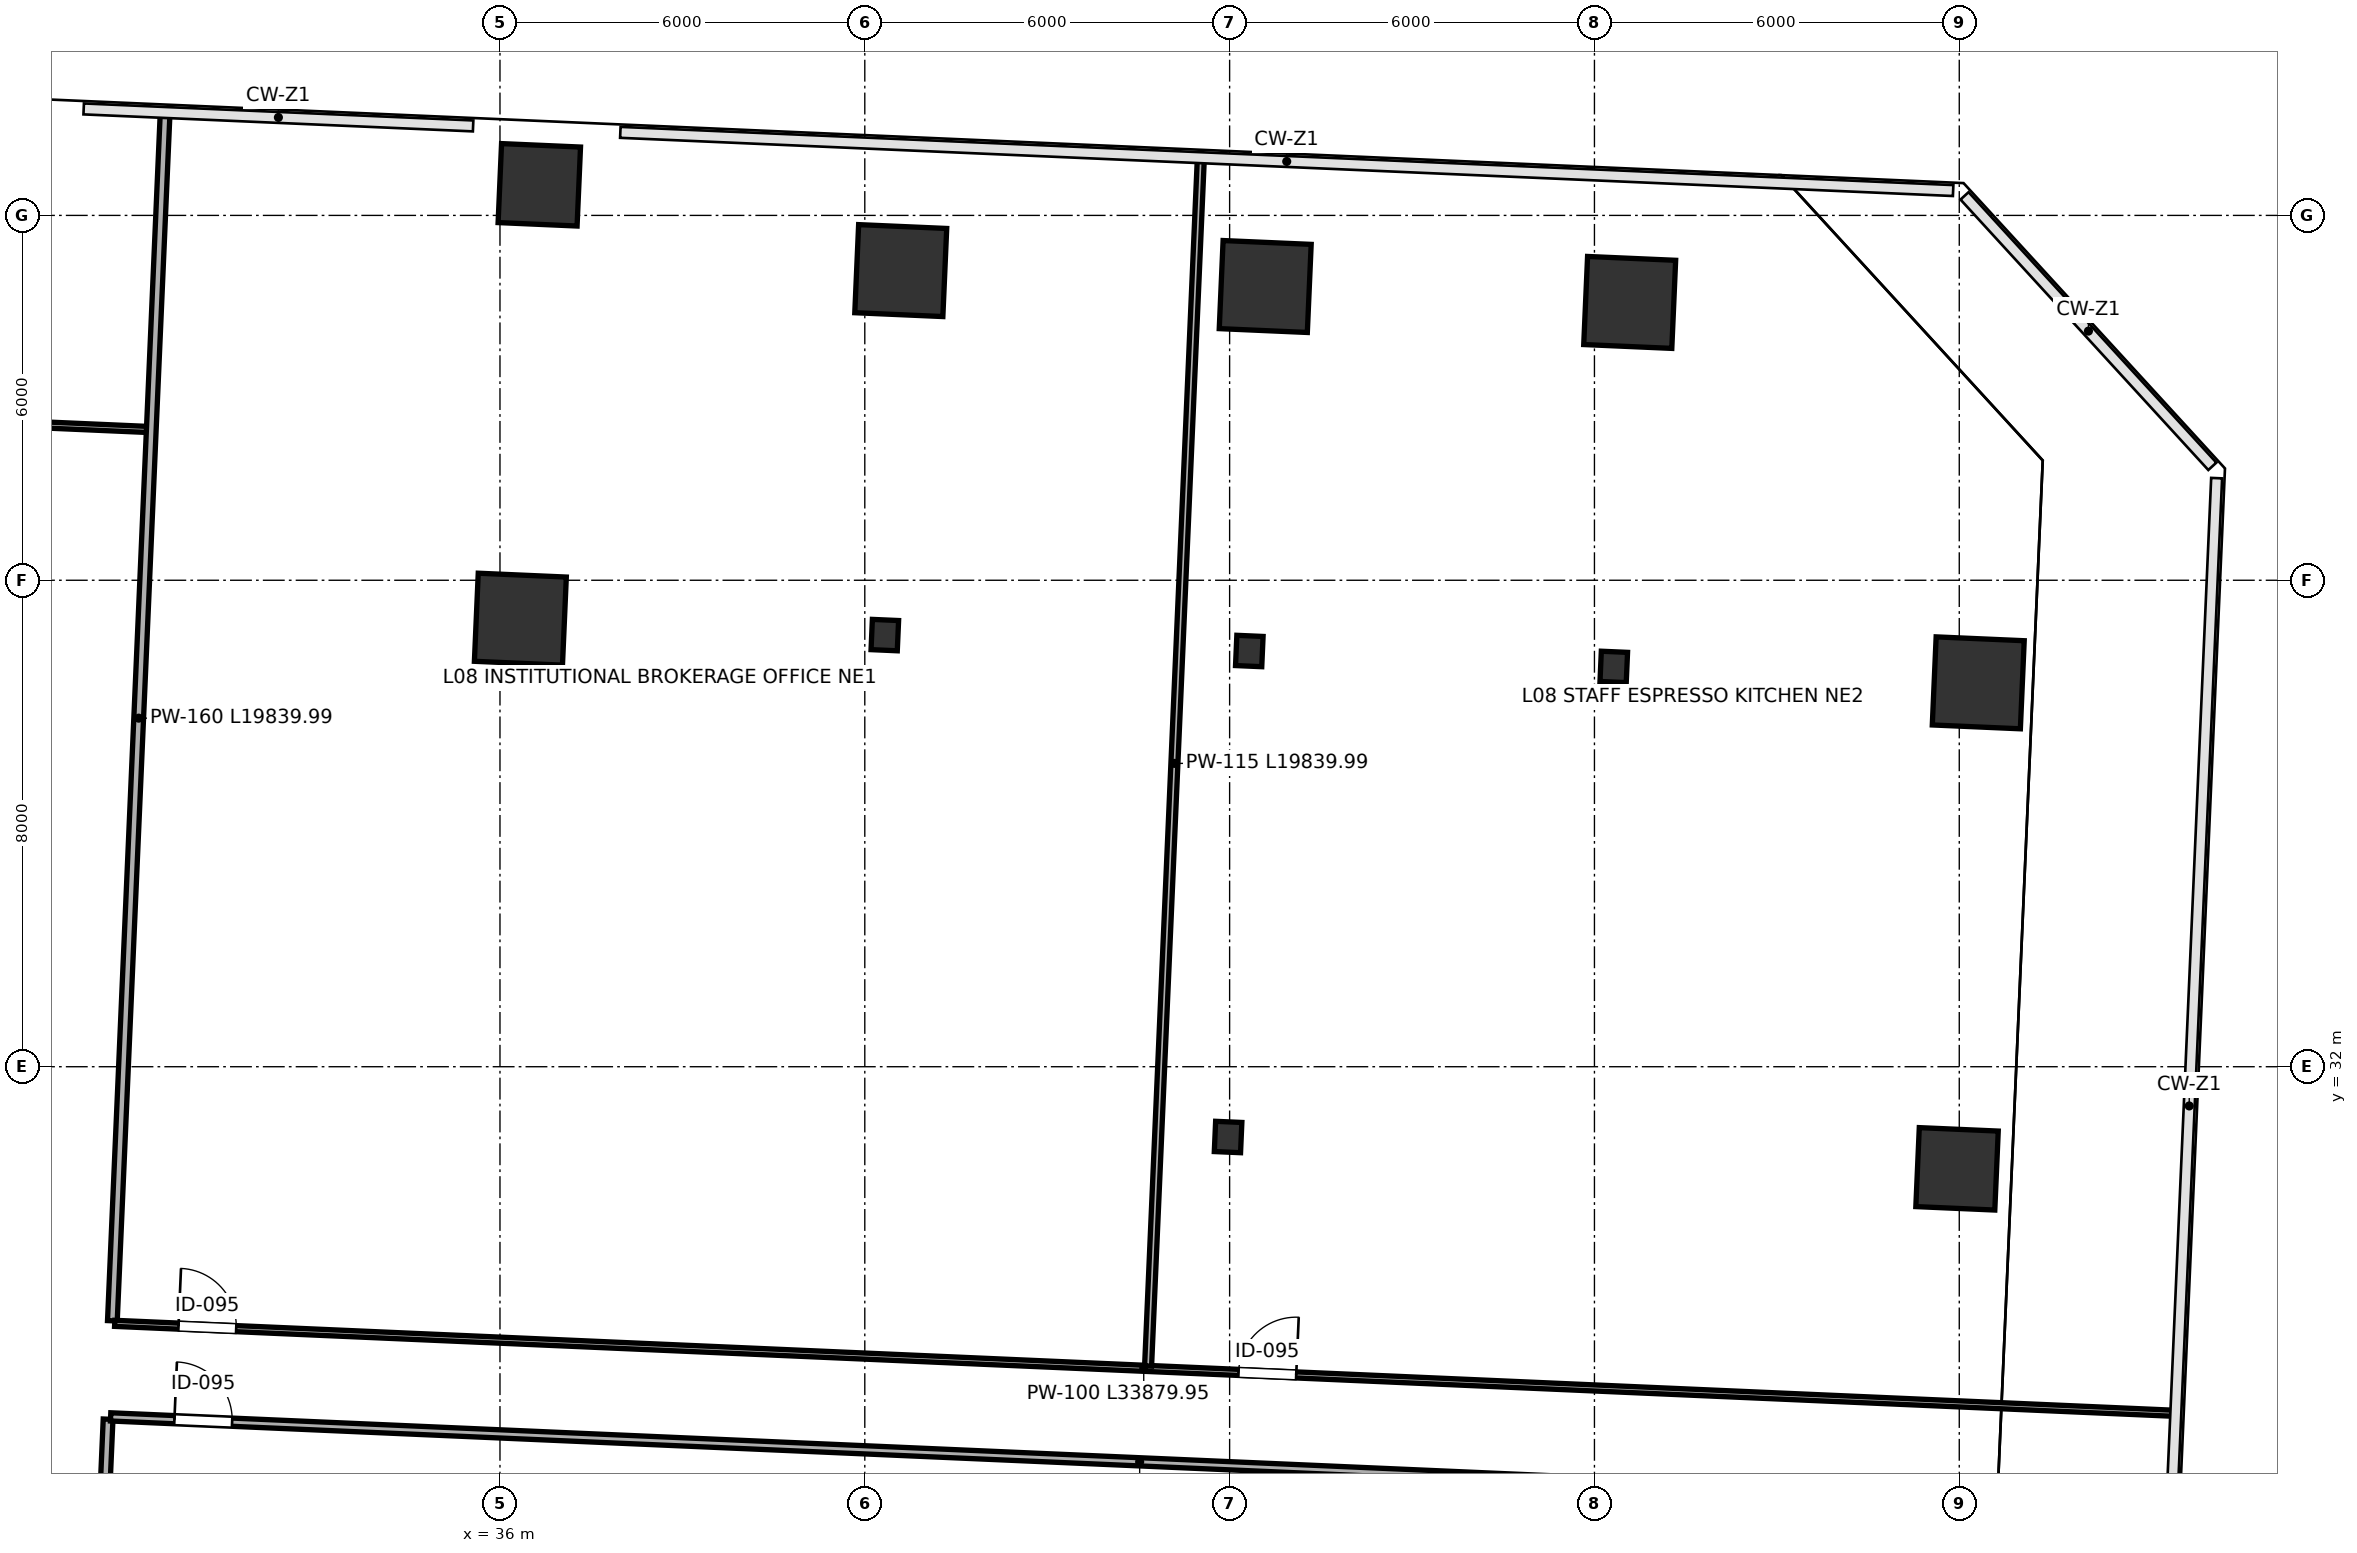
"""IFC4 building model, lengths in metres.
Left out: names, types, materials, properties, quantities, classifications, styles, units other than length and angle.
Written with IfcOpenShell. Run it as: python <this file> out.ifc"""

import sys

from ifc_helpers import new_model, si_unit, direction, frame, frame_2d, origin, origin_2d, place, context, subcontext, project, spatial, rectangle, i_section, extrude, clip, halfspace, source, transform, mapped, element, fill, save


model = new_model("IFC4")
c1 = context("Model", 3, precision=1e-05, world=origin(), true_north=direction((0.0, 1.0)))
c2 = subcontext(c1, "Body", "Model", "MODEL_VIEW")
j1 = project(units=[si_unit("LENGTHUNIT", "METRE"), si_unit("PLANEANGLEUNIT", "RADIAN")], contexts=[c1])
p1 = place(None, origin())
s1 = spatial("IfcSite", under=j1, at=p1, CompositionType="ELEMENT")
p2 = place(p1, origin())
s2 = spatial("IfcBuilding", under=s1, at=p2, CompositionType="ELEMENT")
p3 = place(p2, frame((0.0, 0.0, 37.6)))
s3 = spatial("IfcBuildingStorey", under=s2, at=p3, CompositionType="ELEMENT", Elevation=37.6)
p4 = place(p3, frame((27.656, 46.896, 0.0), z_axis=(0.067215559291, -0.028661729056, 0.997326713709), x_axis=(-0.431886115765, -0.901922515489, 0.003187328695)))
e1 = element("IfcColumn", 1, at=p4, inside=s3, PredefinedType="COLUMN", context=c2, shape_type="Clipping", body=[
    clip(clip(extrude(rectangle(XDim=1.3, YDim=1.3, at=origin_2d()), origin(), (0.0, 0.0, 1.0), 4.813), halfspace(frame((0.0, 0.0, 0.05), z_axis=(0.0, 0.0, -1.0), x_axis=(1.0, 0.0, 0.0)), False)), halfspace(frame((0.0, 0.0, 4.762), z_axis=(0.0, 0.0, 1.0), x_axis=(1.0, 0.0, 0.0)), False)),
])
p5 = place(p3, frame((36.335, 39.36, 0.0), z_axis=(0.032613723534, -0.067611342878, 0.997178545373), x_axis=(-0.918728821038, -0.39487546398, 0.003274345801)))
e2 = element("IfcColumn", 2, at=p5, inside=s3, PredefinedType="COLUMN", context=c2, shape_type="Clipping", body=[
    clip(clip(extrude(rectangle(XDim=1.45, YDim=1.45, at=origin_2d()), origin(), (0.0, 0.0, 1.0), 4.813), halfspace(frame((0.0, 0.0, 0.058), z_axis=(0.0, 0.0, -1.0), x_axis=(1.0, 0.0, 0.0)), False)), halfspace(frame((0.0, 0.0, 4.756), z_axis=(0.0, 0.0, 1.0), x_axis=(1.0, 0.0, 0.0)), False)),
])
p6 = place(p3, frame((36.647, 46.503, 0.0), z_axis=(0.064863629313, -0.06926888751, 0.995487082194), x_axis=(-0.758921651217, -0.651168789985, 0.00413935557)))
e3 = element("IfcColumn", 3, at=p6, inside=s3, PredefinedType="COLUMN", context=c2, shape_type="Clipping", body=[
    clip(clip(extrude(rectangle(XDim=1.3, YDim=1.3, at=origin_2d()), origin(), (0.0, 0.0, 1.0), 4.822), halfspace(frame((0.0, 0.0, 0.065), z_axis=(0.0, 0.0, -1.0), x_axis=(1.0, 0.0, 0.0)), False)), halfspace(frame((0.0, 0.0, 4.756), z_axis=(0.0, 0.0, 1.0), x_axis=(1.0, 0.0, 0.0)), False)),
])
p7 = place(p3, frame((42.329, 39.098, 0.0), z_axis=(0.031075882284, -0.094543563691, 0.995035579316), x_axis=(-0.962645977382, -0.270728421119, 0.004340993869)))
e4 = element("IfcColumn", 4, at=p7, inside=s3, PredefinedType="COLUMN", context=c2, shape_type="Clipping", body=[
    clip(clip(extrude(i_section(OverallWidth=0.432, OverallDepth=0.498, WebThickness=0.056, FlangeThickness=0.089, FilletRadius=0.015, at=origin_2d()), origin(), (0.0, 0.0, 1.0), 4.824), halfspace(frame((0.0, 0.0, 0.027), z_axis=(0.0, 0.0, -1.0), x_axis=(1.0, 0.0, 0.0)), False)), halfspace(frame((0.0, 0.0, 4.797), z_axis=(0.0, 0.0, 1.0), x_axis=(1.0, 0.0, 0.0)), False)),
])
p8 = place(p3, frame((42.591, 45.093, 0.0), z_axis=(0.058075175158, -0.095882164729, 0.993697078851), x_axis=(-0.876978547466, -0.480504649668, 0.004889676023)))
e5 = element("IfcColumn", 5, at=p8, inside=s3, PredefinedType="COLUMN", context=c2, shape_type="Clipping", body=[
    clip(clip(extrude(rectangle(XDim=1.45, YDim=1.45, at=origin_2d()), origin(), (0.0, 0.0, 1.0), 4.83), halfspace(frame((0.0, 0.0, 0.086), z_axis=(0.0, 0.0, -1.0), x_axis=(1.0, 0.0, 0.0)), False)), halfspace(frame((0.0, 0.0, 4.744), z_axis=(0.0, 0.0, 1.0), x_axis=(1.0, 0.0, 0.0)), False)),
])
p9 = place(p3, frame((47.975, 30.844, 0.0), z_axis=(-0.006514480751, -0.119381647256, 0.992827066432), x_axis=(-0.995204428395, 0.097677778525, 0.005215101586)))
e6 = element("IfcColumn", 6, at=p9, inside=s3, PredefinedType="COLUMN", context=c2, shape_type="Clipping", body=[
    clip(clip(extrude(i_section(OverallWidth=0.432, OverallDepth=0.498, WebThickness=0.056, FlangeThickness=0.089, FilletRadius=0.015, at=origin_2d()), origin(), (0.0, 0.0, 1.0), 4.834), halfspace(frame((0.0, 0.0, 0.032), z_axis=(0.0, 0.0, -1.0), x_axis=(1.0, 0.0, 0.0)), False)), halfspace(frame((0.0, 0.0, 4.803), z_axis=(0.0, 0.0, 1.0), x_axis=(1.0, 0.0, 0.0)), False)),
])
p10 = place(p3, frame((48.324, 38.836, 0.0), z_axis=(0.029523163424, -0.121272071294, 0.992180158815), x_axis=(-0.980934571584, -0.194262002877, 0.00544430984)))
e7 = element("IfcColumn", 7, at=p10, inside=s3, PredefinedType="COLUMN", context=c2, shape_type="Clipping", body=[
    clip(clip(extrude(i_section(OverallWidth=0.432, OverallDepth=0.498, WebThickness=0.056, FlangeThickness=0.089, FilletRadius=0.015, at=origin_2d()), origin(), (0.0, 0.0, 1.0), 4.838), halfspace(frame((0.0, 0.0, 0.033), z_axis=(0.0, 0.0, -1.0), x_axis=(1.0, 0.0, 0.0)), False)), halfspace(frame((0.0, 0.0, 4.804), z_axis=(0.0, 0.0, 1.0), x_axis=(1.0, 0.0, 0.0)), False)),
])
p11 = place(p3, frame((48.585, 44.831, 0.0), z_axis=(0.056447032157, -0.122621097533, 0.990847010895), x_axis=(-0.925582471134, -0.378500222776, 0.005888165089)))
e8 = element("IfcColumn", 8, at=p11, inside=s3, PredefinedType="COLUMN", context=c2, shape_type="Clipping", body=[
    clip(clip(extrude(rectangle(XDim=1.45, YDim=1.45, at=origin_2d()), origin(), (0.0, 0.0, 1.0), 4.844), halfspace(frame((0.0, 0.0, 0.104), z_axis=(0.0, 0.0, -1.0), x_axis=(1.0, 0.0, 0.0)), False)), halfspace(frame((0.0, 0.0, 4.74), z_axis=(0.0, 0.0, 1.0), x_axis=(1.0, 0.0, 0.0)), False)),
])
p12 = place(p3, frame((54.318, 38.575, 0.0), z_axis=(0.027908994501, -0.147741668185, 0.988632129514), x_axis=(-0.989690790543, -0.143070356158, 0.006558376519)))
e9 = element("IfcColumn", 9, at=p12, inside=s3, PredefinedType="COLUMN", context=c2, shape_type="Clipping", body=[
    clip(clip(extrude(i_section(OverallWidth=0.432, OverallDepth=0.498, WebThickness=0.056, FlangeThickness=0.089, FilletRadius=0.015, at=origin_2d()), origin(), (0.0, 0.0, 1.0), 4.855), halfspace(frame((0.0, 0.0, 0.04), z_axis=(0.0, 0.0, -1.0), x_axis=(1.0, 0.0, 0.0)), False)), halfspace(frame((0.0, 0.0, 4.815), z_axis=(0.0, 0.0, 1.0), x_axis=(1.0, 0.0, 0.0)), False)),
])
p13 = place(p3, frame((54.58, 44.569, 0.0), z_axis=(0.054839272442, -0.149050330227, 0.98730778041), x_axis=(-0.95247134279, -0.304549421177, 0.006927569902)))
e10 = element("IfcColumn", 10, at=p13, inside=s3, PredefinedType="COLUMN", context=c2, shape_type="Clipping", body=[
    clip(clip(extrude(rectangle(XDim=1.45, YDim=1.45, at=origin_2d()), origin(), (0.0, 0.0, 1.0), 4.862), halfspace(frame((0.0, 0.0, 0.122), z_axis=(0.0, 0.0, -1.0), x_axis=(1.0, 0.0, 0.0)), False)), halfspace(frame((0.0, 0.0, 4.739), z_axis=(0.0, 0.0, 1.0), x_axis=(1.0, 0.0, 0.0)), False)),
])
p14 = place(p3, frame((59.963, 30.321, 0.0), z_axis=(-0.009419364454, -0.172153916291, 0.985025027438), x_axis=(-0.995208767045, 0.097483087631, 0.007520480208)))
e11 = element("IfcColumn", 11, at=p14, inside=s3, PredefinedType="COLUMN", context=c2, shape_type="Clipping", body=[
    clip(clip(extrude(rectangle(XDim=1.3, YDim=1.3, at=origin_2d()), origin(), (0.0, 0.0, 1.0), 4.873), halfspace(frame((0.0, 0.0, 0.119), z_axis=(0.0, 0.0, -1.0), x_axis=(1.0, 0.0, 0.0)), False)), halfspace(frame((0.0, 0.0, 4.753), z_axis=(0.0, 0.0, 1.0), x_axis=(1.0, 0.0, 0.0)), False)),
])
p15 = place(p3, frame((60.312, 38.313, 0.0), z_axis=(0.026387562879, -0.173947615637, 0.984401302081), x_axis=(-0.994187743579, -0.107386385141, 0.007674294959)))
e12 = element("IfcColumn", 12, at=p15, inside=s3, PredefinedType="COLUMN", context=c2, shape_type="Clipping", body=[
    clip(clip(extrude(rectangle(XDim=1.45, YDim=1.45, at=origin_2d()), origin(), (0.0, 0.0, 1.0), 4.876), halfspace(frame((0.0, 0.0, 0.136), z_axis=(0.0, 0.0, -1.0), x_axis=(1.0, 0.0, 0.0)), False)), halfspace(frame((0.0, 0.0, 4.74), z_axis=(0.0, 0.0, 1.0), x_axis=(1.0, 0.0, 0.0)), False)),
])
p16 = place(p3, frame((4.47, 43.604, 0.0), z_axis=(0.0, 0.0, 1.0), x_axis=(0.999047795436, -0.04362914662, 0.0)))
e13 = element("IfcWall", 13, at=p16, inside=s3, PredefinedType="PARTITIONING", context=c2, shape_type="SweptSolid", body=[
    extrude(rectangle(XDim=25.78, YDim=0.1, at=frame_2d((12.89, 0.0))), origin(), (0.0, 0.0, 1.0), 4.56),
])
p17 = place(p16, frame((0.91, 0.0, 0.0)))
e14 = element("IfcOpeningElement", 14, at=p17, cuts=e13, PredefinedType="OPENING", context=c2, shape_type="SweptSolid", body=[
    extrude(rectangle(XDim=0.95, YDim=2.15, at=frame_2d((0.475, 1.075))), frame((0.0, 0.06, 0.0), z_axis=(0.0, -1.0, 0.0), x_axis=(1.0, 0.0, 0.0)), (0.0, 0.0, 1.0), 0.12),
])
p18 = place(p3, frame((29.625, 27.822, 0.0), z_axis=(0.0, 0.0, 1.0), x_axis=(0.043623060059, 0.999048061222, 0.0)))
e15 = element("IfcWall", 15, at=p18, inside=s3, PredefinedType="PARTITIONING", context=c2, shape_type="SweptSolid", body=[
    extrude(rectangle(XDim=19.84, YDim=0.16, at=frame_2d((9.92, 0.0))), origin(), (0.0, 0.0, 1.0), 3.695),
])
p19 = place(p3, frame((29.006, 13.635, 0.0), z_axis=(0.0, 0.0, 1.0), x_axis=(0.043626715414, 0.999047901605, 0.0)))
e16 = element("IfcWall", 16, at=p19, inside=s3, PredefinedType="PARTITIONING", context=c2, shape_type="SweptSolid", body=[
    extrude(rectangle(XDim=12.58, YDim=0.16, at=frame_2d((6.29, 0.0))), origin(), (0.0, 0.0, 1.0), 4.56),
])
p20 = place(p3, frame((29.664, 27.78, 0.0), z_axis=(0.0, 0.0, 1.0), x_axis=(0.999048269666, -0.043618286038, 0.0)))
e17 = element("IfcWall", 17, at=p20, inside=s3, PredefinedType="PARTITIONING", context=c2, shape_type="SweptSolid", body=[
    extrude(rectangle(XDim=33.88, YDim=0.1, at=frame_2d((16.94, 0.0))), origin(), (0.0, 0.0, 1.0), 3.695),
])
p21 = place(p20, frame((1.05, 0.0, 0.0)))
e18 = element("IfcOpeningElement", 18, at=p21, cuts=e17, PredefinedType="OPENING", context=c2, shape_type="SweptSolid", body=[
    extrude(rectangle(XDim=0.95, YDim=2.15, at=frame_2d((0.475, 1.075))), frame((0.0, 0.06, 0.0), z_axis=(0.0, -1.0, 0.0), x_axis=(1.0, 0.0, 0.0)), (0.0, 0.0, 1.0), 0.12),
])
p22 = place(p20, frame((18.5, 0.0, 0.0)))
e19 = element("IfcOpeningElement", 19, at=p22, cuts=e17, PredefinedType="OPENING", context=c2, shape_type="SweptSolid", body=[
    extrude(rectangle(XDim=0.95, YDim=2.15, at=frame_2d((0.475, 1.075))), frame((0.0, 0.06, 0.0), z_axis=(0.0, -1.0, 0.0), x_axis=(1.0, 0.0, 0.0)), (0.0, 0.0, 1.0), 0.12),
])
p23 = place(p3, frame((29.597, 26.241, 0.0), z_axis=(0.0, 0.0, 1.0), x_axis=(0.999047941909, -0.043625792456, 0.0)))
e20 = element("IfcWall", 20, at=p23, inside=s3, PredefinedType="PARTITIONING", context=c2, shape_type="SweptSolid", body=[
    extrude(rectangle(XDim=33.88, YDim=0.135, at=frame_2d((16.94, 0.0))), origin(), (0.0, 0.0, 1.0), 3.695),
])
p24 = place(p23, frame((1.05, 0.0, 0.0)))
e21 = element("IfcOpeningElement", 21, at=p24, cuts=e20, PredefinedType="OPENING", context=c2, shape_type="SweptSolid", body=[
    extrude(rectangle(XDim=0.95, YDim=2.15, at=frame_2d((0.475, 1.075))), frame((0.0, 0.078, 0.0), z_axis=(0.0, -1.0, 0.0), x_axis=(1.0, 0.0, 0.0)), (0.0, 0.0, 1.0), 0.155),
])
p25 = place(p3, frame((46.659, 27.078, 0.0), z_axis=(0.0, 0.0, 1.0), x_axis=(0.043623060059, 0.999048061222, 0.0)))
e22 = element("IfcWall", 22, at=p25, inside=s3, PredefinedType="PARTITIONING", context=c2, shape_type="SweptSolid", body=[
    extrude(rectangle(XDim=19.84, YDim=0.115, at=frame_2d((9.92, 0.0))), origin(), (0.0, 0.0, 1.0), 3.923),
])
m1 = source(origin(), c2, "Body", "SweptSolid", [
    extrude(rectangle(XDim=0.95, YDim=2.15, at=frame_2d((0.475, 1.075))), frame((0.0, 0.025, 0.0), z_axis=(0.0, -1.0, 0.0), x_axis=(1.0, 0.0, 0.0)), (0.0, 0.0, 1.0), 0.05),
])
p26 = place(p21, origin())
e23 = element("IfcDoor", 23, at=p26, inside=s3, OperationType="SINGLE_SWING_LEFT", PredefinedType="DOOR", context=c2, shape_type="MappedRepresentation", body=[
    mapped(m1, transform((0.0, 0.0, 0.0), scale=1.0)),
])
fill(e18, e23)
p27 = place(p22, origin())
e24 = element("IfcDoor", 24, at=p27, inside=s3, OperationType="SINGLE_SWING_RIGHT", PredefinedType="DOOR", context=c2, shape_type="MappedRepresentation", body=[
    mapped(m1, transform((0.0, 0.0, 0.0), scale=1.0)),
])
fill(e19, e24)
p28 = place(p24, origin())
e25 = element("IfcDoor", 25, at=p28, inside=s3, OperationType="SINGLE_SWING_LEFT", PredefinedType="DOOR", context=c2, shape_type="MappedRepresentation", body=[
    mapped(m1, transform((0.0, 0.0, 0.0), scale=1.0)),
])
fill(e21, e25)
save(model, sys.argv[1])
